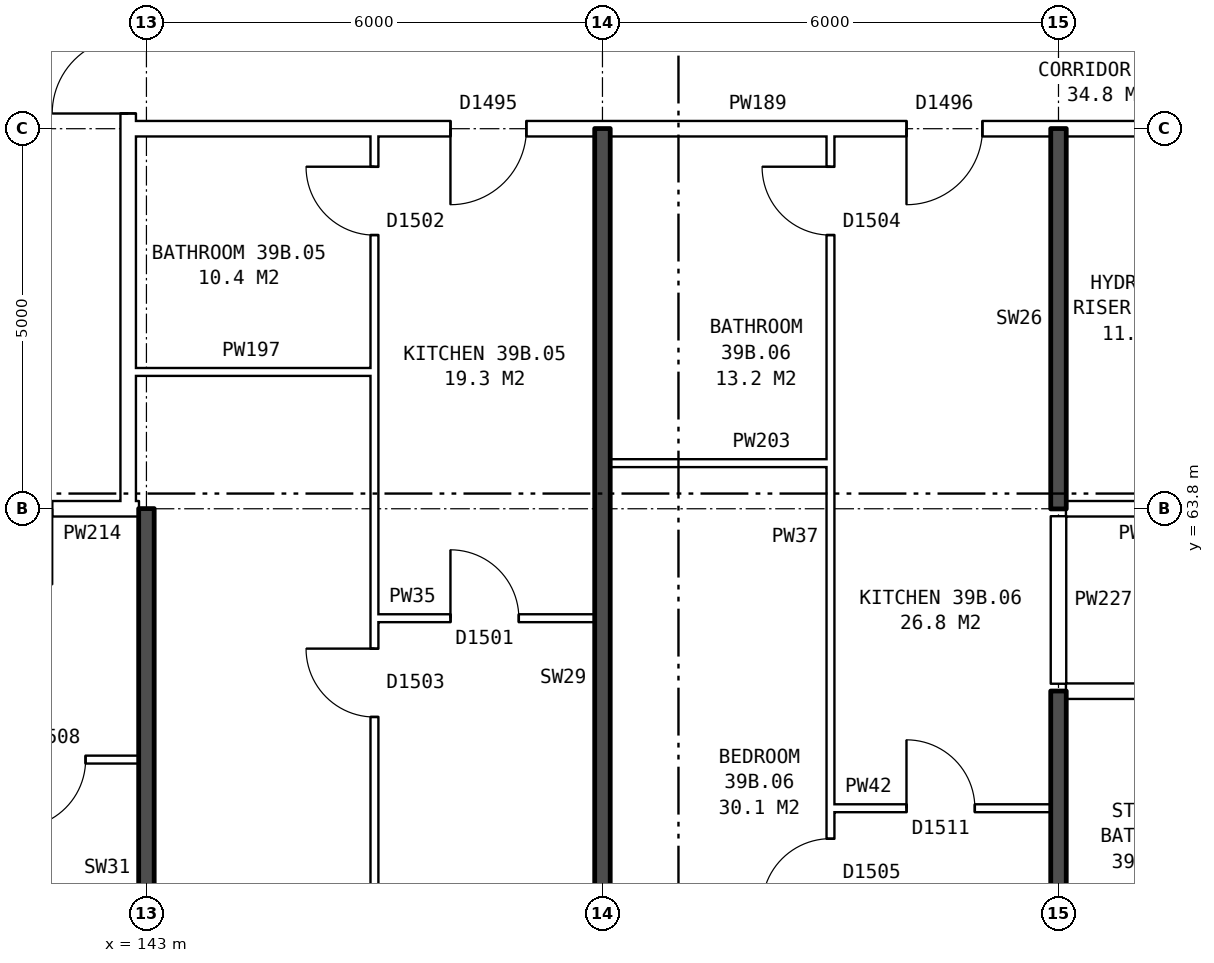
"""IFC4 building model, lengths in metres.
Left out: names, types, materials, properties, quantities, classifications, styles, units other than length and angle.
Written with IfcOpenShell. Run it as: python <this file> out.ifc"""

import sys

from ifc_helpers import new_model, si_unit, direction, frame, frame_2d, origin, place, context, subcontext, project, spatial, rectangle, extrude, element, fill, save


model = new_model("IFC4")
c1 = context("Model", 3, precision=1e-05, world=origin(), true_north=direction((0.0, 1.0)))
c2 = subcontext(c1, "Body", "Model", "MODEL_VIEW")
j1 = project(units=[si_unit("LENGTHUNIT", "METRE"), si_unit("PLANEANGLEUNIT", "RADIAN")], contexts=[c1])
p1 = place(None, origin())
s1 = spatial("IfcSite", under=j1, at=p1, CompositionType="ELEMENT")
p2 = place(p1, origin())
s2 = spatial("IfcBuilding", under=s1, at=p2, CompositionType="ELEMENT")
p3 = place(p2, frame((0.0, 0.0, 139.2)))
s3 = spatial("IfcBuildingStorey", under=s2, at=p3, CompositionType="ELEMENT", Elevation=139.2)
p4 = place(p3, frame((142.76, 63.9, 0.0), z_axis=(0.0, 0.0, 1.0), x_axis=(0.0, 1.0, 0.0)))
e1 = element("IfcWall", 1, at=p4, inside=s3, PredefinedType="PARTITIONING", context=c2, shape_type="SweptSolid", body=[
    extrude(rectangle(XDim=12.2, YDim=0.2, at=frame_2d((6.1, 0.0))), origin(), (0.0, 0.0, 1.0), 2.85),
])
p5 = place(p4, frame((5.1, 0.0, 0.0)))
e2 = element("IfcOpeningElement", 2, at=p5, cuts=e1, PredefinedType="OPENING", context=c2, shape_type="SweptSolid", body=[
    extrude(rectangle(XDim=2.0, YDim=2.1, at=frame_2d((1.0, 1.05))), frame((0.0, 0.11, 0.0), z_axis=(0.0, -1.0, 0.0), x_axis=(1.0, 0.0, 0.0)), (0.0, 0.0, 1.0), 0.22),
])
p6 = place(p3, frame((152.0, 59.86, 0.0), z_axis=(0.0, 0.0, 1.0), x_axis=(1.0, 0.0, 0.0)))
e3 = element("IfcWall", 3, at=p6, inside=s3, PredefinedType="PARTITIONING", context=c2, shape_type="SweptSolid", body=[
    extrude(rectangle(XDim=2.9, YDim=0.1, at=frame_2d((1.45, 0.0))), origin(), (0.0, 0.0, 1.0), 2.85),
])
p7 = place(p6, frame((1.0, 0.0, 0.0)))
e4 = element("IfcOpeningElement", 4, at=p7, cuts=e3, PredefinedType="OPENING", context=c2, shape_type="SweptSolid", body=[
    extrude(rectangle(XDim=0.9, YDim=2.1, at=frame_2d((0.45, 1.05))), frame((0.0, 0.06, 0.0), z_axis=(0.0, -1.0, 0.0), x_axis=(1.0, 0.0, 0.0)), (0.0, 0.0, 1.0), 0.12),
])
p8 = place(p3, frame((137.1, 60.5, 0.0), z_axis=(0.0, 0.0, 1.0), x_axis=(1.0, 0.0, 0.0)))
e5 = element("IfcWall", 5, at=p8, inside=s3, PredefinedType="PARTITIONING", context=c2, shape_type="SweptSolid", body=[
    extrude(rectangle(XDim=5.8, YDim=0.1, at=frame_2d((2.9, 0.0))), origin(), (0.0, 0.0, 1.0), 2.85),
])
p9 = place(p8, frame((1.3, 0.0, 0.0)))
e6 = element("IfcOpeningElement", 6, at=p9, cuts=e5, PredefinedType="OPENING", context=c2, shape_type="SweptSolid", body=[
    extrude(rectangle(XDim=0.9, YDim=2.1, at=frame_2d((0.45, 1.05))), frame((0.0, 0.06, 0.0), z_axis=(0.0, -1.0, 0.0), x_axis=(1.0, 0.0, 0.0)), (0.0, 0.0, 1.0), 0.12),
])
p10 = place(p8, frame((4.2, 0.0, 0.0)))
e7 = element("IfcOpeningElement", 7, at=p10, cuts=e5, PredefinedType="OPENING", context=c2, shape_type="SweptSolid", body=[
    extrude(rectangle(XDim=0.9, YDim=2.1, at=frame_2d((0.45, 1.05))), frame((0.0, 0.06, 0.0), z_axis=(0.0, -1.0, 0.0), x_axis=(1.0, 0.0, 0.0)), (0.0, 0.0, 1.0), 0.12),
])
p11 = place(p3, frame((155.1, 61.4, 0.0), z_axis=(0.0, 0.0, 1.0), x_axis=(1.0, 0.0, 0.0)))
e8 = element("IfcWall", 8, at=p11, inside=s3, PredefinedType="PARTITIONING", context=c2, shape_type="SweptSolid", body=[
    extrude(rectangle(XDim=17.29, YDim=0.2, at=frame_2d((8.645, 0.0))), origin(), (0.0, 0.0, 1.0), 2.85),
])
p12 = place(p11, frame((3.6, 0.0, 0.0)))
e9 = element("IfcOpeningElement", 9, at=p12, cuts=e8, PredefinedType="OPENING", context=c2, shape_type="SweptSolid", body=[
    extrude(rectangle(XDim=1.0, YDim=2.1, at=frame_2d((0.5, 1.05))), frame((0.0, 0.11, 0.0), z_axis=(0.0, -1.0, 0.0), x_axis=(1.0, 0.0, 0.0)), (0.0, 0.0, 1.0), 0.22),
])
p13 = place(p11, frame((8.4, 0.0, 0.0)))
e10 = element("IfcOpeningElement", 10, at=p13, cuts=e8, PredefinedType="OPENING", context=c2, shape_type="SweptSolid", body=[
    extrude(rectangle(XDim=1.0, YDim=2.1, at=frame_2d((0.5, 1.05))), frame((0.0, 0.11, 0.0), z_axis=(0.0, -1.0, 0.0), x_axis=(1.0, 0.0, 0.0)), (0.0, 0.0, 1.0), 0.22),
])
p14 = place(p3, frame((146.0, 62.36, 0.0), z_axis=(0.0, 0.0, 1.0), x_axis=(1.0, 0.0, 0.0)))
e11 = element("IfcWall", 11, at=p14, inside=s3, PredefinedType="PARTITIONING", context=c2, shape_type="SweptSolid", body=[
    extrude(rectangle(XDim=2.9, YDim=0.1, at=frame_2d((1.45, 0.0))), origin(), (0.0, 0.0, 1.0), 2.85),
])
p15 = place(p14, frame((1.0, 0.0, 0.0)))
e12 = element("IfcOpeningElement", 12, at=p15, cuts=e11, PredefinedType="OPENING", context=c2, shape_type="SweptSolid", body=[
    extrude(rectangle(XDim=0.9, YDim=2.1, at=frame_2d((0.45, 1.05))), frame((0.0, 0.06, 0.0), z_axis=(0.0, -1.0, 0.0), x_axis=(1.0, 0.0, 0.0)), (0.0, 0.0, 1.0), 0.12),
])
p16 = place(p3, frame((139.76, 63.8, 0.0), z_axis=(0.0, 0.0, 1.0), x_axis=(1.0, 0.0, 0.0)))
e13 = element("IfcWall", 13, at=p16, inside=s3, PredefinedType="PARTITIONING", context=c2, shape_type="SweptSolid", body=[
    extrude(rectangle(XDim=3.0, YDim=0.2, at=frame_2d((1.5, 0.0))), origin(), (0.0, 0.0, 1.0), 2.85),
])
p17 = place(p16, frame((1.0, 0.0, 0.0)))
e14 = element("IfcOpeningElement", 14, at=p17, cuts=e13, PredefinedType="OPENING", context=c2, shape_type="SweptSolid", body=[
    extrude(rectangle(XDim=1.0, YDim=2.1, at=frame_2d((0.5, 1.05))), frame((0.0, 0.11, 0.0), z_axis=(0.0, -1.0, 0.0), x_axis=(1.0, 0.0, 0.0)), (0.0, 0.0, 1.0), 0.22),
])
p18 = place(p3, frame((142.76, 63.8, 0.0), z_axis=(0.0, 0.0, 1.0), x_axis=(1.0, 0.0, 0.0)))
e15 = element("IfcWall", 15, at=p18, inside=s3, PredefinedType="PARTITIONING", context=c2, shape_type="SweptSolid", body=[
    extrude(rectangle(XDim=0.14, YDim=0.2, at=frame_2d((0.07, 0.0))), origin(), (0.0, 0.0, 1.0), 2.85),
])
p19 = place(p3, frame((155.1, 63.8, 0.0), z_axis=(0.0, 0.0, 1.0), x_axis=(1.0, 0.0, 0.0)))
e16 = element("IfcWall", 16, at=p19, inside=s3, PredefinedType="PARTITIONING", context=c2, shape_type="SweptSolid", body=[
    extrude(rectangle(XDim=2.14, YDim=0.2, at=frame_2d((1.07, 0.0))), origin(), (0.0, 0.0, 1.0), 2.85),
])
p20 = place(p3, frame((149.1, 64.4, 0.0), z_axis=(0.0, 0.0, 1.0), x_axis=(1.0, 0.0, 0.0)))
e17 = element("IfcWall", 17, at=p20, inside=s3, PredefinedType="PARTITIONING", context=c2, shape_type="SweptSolid", body=[
    extrude(rectangle(XDim=2.9, YDim=0.1, at=frame_2d((1.45, 0.0))), origin(), (0.0, 0.0, 1.0), 2.85),
])
p21 = place(p3, frame((142.76, 65.6, 0.0), z_axis=(0.0, 0.0, 1.0), x_axis=(1.0, 0.0, 0.0)))
e18 = element("IfcWall", 18, at=p21, inside=s3, PredefinedType="PARTITIONING", context=c2, shape_type="SweptSolid", body=[
    extrude(rectangle(XDim=3.24, YDim=0.1, at=frame_2d((1.62, 0.0))), origin(), (0.0, 0.0, 1.0), 2.85),
])
p22 = place(p3, frame((142.76, 68.8, 0.0), z_axis=(0.0, 0.0, 1.0), x_axis=(1.0, 0.0, 0.0)))
e19 = element("IfcWall", 19, at=p22, inside=s3, PredefinedType="PARTITIONING", context=c2, shape_type="SweptSolid", body=[
    extrude(rectangle(XDim=14.48, YDim=0.2, at=frame_2d((7.24, 0.0))), origin(), (0.0, 0.0, 1.0), 2.85),
])
p23 = place(p22, frame((4.24, 0.0, 0.0)))
e20 = element("IfcOpeningElement", 20, at=p23, cuts=e19, PredefinedType="OPENING", context=c2, shape_type="SweptSolid", body=[
    extrude(rectangle(XDim=1.0, YDim=2.1, at=frame_2d((0.5, 1.05))), frame((0.0, 0.11, 0.0), z_axis=(0.0, -1.0, 0.0), x_axis=(1.0, 0.0, 0.0)), (0.0, 0.0, 1.0), 0.22),
])
p24 = place(p22, frame((10.24, 0.0, 0.0)))
e21 = element("IfcOpeningElement", 21, at=p24, cuts=e19, PredefinedType="OPENING", context=c2, shape_type="SweptSolid", body=[
    extrude(rectangle(XDim=1.0, YDim=2.1, at=frame_2d((0.5, 1.05))), frame((0.0, 0.11, 0.0), z_axis=(0.0, -1.0, 0.0), x_axis=(1.0, 0.0, 0.0)), (0.0, 0.0, 1.0), 0.22),
])
p25 = place(p3, frame((143.0, 54.36, 0.0), z_axis=(0.0, 0.0, 1.0), x_axis=(0.0, 1.0, 0.0)))
e22 = element("IfcWall", 22, at=p25, inside=s3, PredefinedType="SOLIDWALL", context=c2, shape_type="SweptSolid", body=[
    extrude(rectangle(XDim=9.44, YDim=0.2, at=frame_2d((4.72, 0.0))), origin(), (0.0, 0.0, 1.0), 2.85),
])
p26 = place(p3, frame((146.0, 54.36, 0.0), z_axis=(0.0, 0.0, 1.0), x_axis=(0.0, 1.0, 0.0)))
e23 = element("IfcWall", 23, at=p26, inside=s3, PredefinedType="PARTITIONING", context=c2, shape_type="SweptSolid", body=[
    extrude(rectangle(XDim=14.34, YDim=0.1, at=frame_2d((7.17, 0.0))), origin(), (0.0, 0.0, 1.0), 2.85),
])
p27 = place(p26, frame((6.7, 0.0, 0.0)))
e24 = element("IfcOpeningElement", 24, at=p27, cuts=e23, PredefinedType="OPENING", context=c2, shape_type="SweptSolid", body=[
    extrude(rectangle(XDim=0.9, YDim=2.1, at=frame_2d((0.45, 1.05))), frame((0.0, 0.06, 0.0), z_axis=(0.0, -1.0, 0.0), x_axis=(1.0, 0.0, 0.0)), (0.0, 0.0, 1.0), 0.12),
])
p28 = place(p26, frame((13.04, 0.0, 0.0)))
e25 = element("IfcOpeningElement", 25, at=p28, cuts=e23, PredefinedType="OPENING", context=c2, shape_type="SweptSolid", body=[
    extrude(rectangle(XDim=0.9, YDim=2.1, at=frame_2d((0.45, 1.05))), frame((0.0, 0.06, 0.0), z_axis=(0.0, -1.0, 0.0), x_axis=(1.0, 0.0, 0.0)), (0.0, 0.0, 1.0), 0.12),
])
p29 = place(p3, frame((149.0, 54.36, 0.0), z_axis=(0.0, 0.0, 1.0), x_axis=(0.0, 1.0, 0.0)))
e26 = element("IfcWall", 26, at=p29, inside=s3, PredefinedType="SOLIDWALL", context=c2, shape_type="SweptSolid", body=[
    extrude(rectangle(XDim=14.44, YDim=0.2, at=frame_2d((7.22, 0.0))), origin(), (0.0, 0.0, 1.0), 2.85),
])
p30 = place(p3, frame((152.0, 54.36, 0.0), z_axis=(0.0, 0.0, 1.0), x_axis=(0.0, 1.0, 0.0)))
e27 = element("IfcWall", 27, at=p30, inside=s3, PredefinedType="PARTITIONING", context=c2, shape_type="SweptSolid", body=[
    extrude(rectangle(XDim=14.34, YDim=0.1, at=frame_2d((7.17, 0.0))), origin(), (0.0, 0.0, 1.0), 2.85),
])
p31 = place(p30, frame((4.2, 0.0, 0.0)))
e28 = element("IfcOpeningElement", 28, at=p31, cuts=e27, PredefinedType="OPENING", context=c2, shape_type="SweptSolid", body=[
    extrude(rectangle(XDim=0.9, YDim=2.1, at=frame_2d((0.45, 1.05))), frame((0.0, 0.06, 0.0), z_axis=(0.0, -1.0, 0.0), x_axis=(1.0, 0.0, 0.0)), (0.0, 0.0, 1.0), 0.12),
])
p32 = place(p30, frame((13.04, 0.0, 0.0)))
e29 = element("IfcOpeningElement", 29, at=p32, cuts=e27, PredefinedType="OPENING", context=c2, shape_type="SweptSolid", body=[
    extrude(rectangle(XDim=0.9, YDim=2.1, at=frame_2d((0.45, 1.05))), frame((0.0, 0.06, 0.0), z_axis=(0.0, -1.0, 0.0), x_axis=(1.0, 0.0, 0.0)), (0.0, 0.0, 1.0), 0.12),
])
p33 = place(p3, frame((155.0, 54.36, 0.0), z_axis=(0.0, 0.0, 1.0), x_axis=(0.0, 1.0, 0.0)))
e30 = element("IfcWall", 30, at=p33, inside=s3, PredefinedType="SOLIDWALL", context=c2, shape_type="SweptSolid", body=[
    extrude(rectangle(XDim=7.04, YDim=0.2, at=frame_2d((3.52, 0.0))), origin(), (0.0, 0.0, 1.0), 2.85),
])
p34 = place(p3, frame((155.0, 61.5, 0.0), z_axis=(0.0, 0.0, 1.0), x_axis=(0.0, 1.0, 0.0)))
e31 = element("IfcWall", 31, at=p34, inside=s3, PredefinedType="PARTITIONING", context=c2, shape_type="SweptSolid", body=[
    extrude(rectangle(XDim=2.2, YDim=0.2, at=frame_2d((1.1, 0.0))), origin(), (0.0, 0.0, 1.0), 2.85),
])
p35 = place(p3, frame((155.0, 63.8, 0.0), z_axis=(0.0, 0.0, 1.0), x_axis=(0.0, 1.0, 0.0)))
e32 = element("IfcWall", 32, at=p35, inside=s3, PredefinedType="SOLIDWALL", context=c2, shape_type="SweptSolid", body=[
    extrude(rectangle(XDim=5.0, YDim=0.2, at=frame_2d((2.5, 0.0))), origin(), (0.0, 0.0, 1.0), 2.85),
])
p36 = place(p5, origin())
e33 = element("IfcDoor", 33, at=p36, inside=s3, OperationType="DOUBLE_DOOR_SINGLE_SWING", PredefinedType="DOOR", context=c2, shape_type="SweptSolid", body=[
    extrude(rectangle(XDim=2.0, YDim=2.1, at=frame_2d((1.0, 1.05))), frame((0.0, 0.025, 0.0), z_axis=(0.0, -1.0, 0.0), x_axis=(1.0, 0.0, 0.0)), (0.0, 0.0, 1.0), 0.05),
])
fill(e2, e33)
p37 = place(p10, frame((0.9, 0.0, 0.0), z_axis=(0.0, 0.0, 1.0), x_axis=(-1.0, 0.0, 0.0)))
e34 = element("IfcDoor", 34, at=p37, inside=s3, OperationType="SINGLE_SWING_RIGHT", PredefinedType="DOOR", context=c2, shape_type="SweptSolid", body=[
    extrude(rectangle(XDim=0.9, YDim=2.1, at=frame_2d((0.45, 1.05))), frame((0.0, 0.025, 0.0), z_axis=(0.0, -1.0, 0.0), x_axis=(1.0, 0.0, 0.0)), (0.0, 0.0, 1.0), 0.05),
])
fill(e7, e34)
p38 = place(p27, origin())
e35 = element("IfcDoor", 35, at=p38, inside=s3, OperationType="SINGLE_SWING_RIGHT", PredefinedType="DOOR", context=c2, shape_type="SweptSolid", body=[
    extrude(rectangle(XDim=0.9, YDim=2.1, at=frame_2d((0.45, 1.05))), frame((0.0, 0.025, 0.0), z_axis=(0.0, -1.0, 0.0), x_axis=(1.0, 0.0, 0.0)), (0.0, 0.0, 1.0), 0.05),
])
fill(e24, e35)
p39 = place(p23, frame((1.0, 0.0, 0.0), z_axis=(0.0, 0.0, 1.0), x_axis=(-1.0, 0.0, 0.0)))
e36 = element("IfcDoor", 36, at=p39, inside=s3, OperationType="SINGLE_SWING_RIGHT", PredefinedType="DOOR", context=c2, shape_type="SweptSolid", body=[
    extrude(rectangle(XDim=1.0, YDim=2.1, at=frame_2d((0.5, 1.05))), frame((0.0, 0.025, 0.0), z_axis=(0.0, -1.0, 0.0), x_axis=(1.0, 0.0, 0.0)), (0.0, 0.0, 1.0), 0.05),
])
fill(e20, e36)
p40 = place(p15, origin())
e37 = element("IfcDoor", 37, at=p40, inside=s3, OperationType="SINGLE_SWING_LEFT", PredefinedType="DOOR", context=c2, shape_type="SweptSolid", body=[
    extrude(rectangle(XDim=0.9, YDim=2.1, at=frame_2d((0.45, 1.05))), frame((0.0, 0.025, 0.0), z_axis=(0.0, -1.0, 0.0), x_axis=(1.0, 0.0, 0.0)), (0.0, 0.0, 1.0), 0.05),
])
fill(e12, e37)
p41 = place(p28, origin())
e38 = element("IfcDoor", 38, at=p41, inside=s3, OperationType="SINGLE_SWING_RIGHT", PredefinedType="DOOR", context=c2, shape_type="SweptSolid", body=[
    extrude(rectangle(XDim=0.9, YDim=2.1, at=frame_2d((0.45, 1.05))), frame((0.0, 0.025, 0.0), z_axis=(0.0, -1.0, 0.0), x_axis=(1.0, 0.0, 0.0)), (0.0, 0.0, 1.0), 0.05),
])
fill(e25, e38)
p42 = place(p31, origin())
e39 = element("IfcDoor", 39, at=p42, inside=s3, OperationType="SINGLE_SWING_LEFT", PredefinedType="DOOR", context=c2, shape_type="SweptSolid", body=[
    extrude(rectangle(XDim=0.9, YDim=2.1, at=frame_2d((0.45, 1.05))), frame((0.0, 0.025, 0.0), z_axis=(0.0, -1.0, 0.0), x_axis=(1.0, 0.0, 0.0)), (0.0, 0.0, 1.0), 0.05),
])
fill(e28, e39)
p43 = place(p24, frame((1.0, 0.0, 0.0), z_axis=(0.0, 0.0, 1.0), x_axis=(-1.0, 0.0, 0.0)))
e40 = element("IfcDoor", 40, at=p43, inside=s3, OperationType="SINGLE_SWING_RIGHT", PredefinedType="DOOR", context=c2, shape_type="SweptSolid", body=[
    extrude(rectangle(XDim=1.0, YDim=2.1, at=frame_2d((0.5, 1.05))), frame((0.0, 0.025, 0.0), z_axis=(0.0, -1.0, 0.0), x_axis=(1.0, 0.0, 0.0)), (0.0, 0.0, 1.0), 0.05),
])
fill(e21, e40)
p44 = place(p7, origin())
e41 = element("IfcDoor", 41, at=p44, inside=s3, OperationType="SINGLE_SWING_LEFT", PredefinedType="DOOR", context=c2, shape_type="SweptSolid", body=[
    extrude(rectangle(XDim=0.9, YDim=2.1, at=frame_2d((0.45, 1.05))), frame((0.0, 0.025, 0.0), z_axis=(0.0, -1.0, 0.0), x_axis=(1.0, 0.0, 0.0)), (0.0, 0.0, 1.0), 0.05),
])
fill(e4, e41)
p45 = place(p32, origin())
e42 = element("IfcDoor", 42, at=p45, inside=s3, OperationType="SINGLE_SWING_RIGHT", PredefinedType="DOOR", context=c2, shape_type="SweptSolid", body=[
    extrude(rectangle(XDim=0.9, YDim=2.1, at=frame_2d((0.45, 1.05))), frame((0.0, 0.025, 0.0), z_axis=(0.0, -1.0, 0.0), x_axis=(1.0, 0.0, 0.0)), (0.0, 0.0, 1.0), 0.05),
])
fill(e29, e42)
save(model, sys.argv[1])
